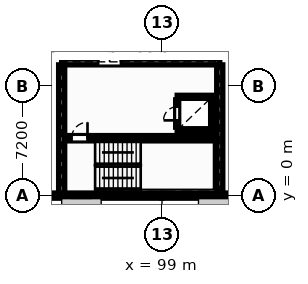
"""IFC4 building model, lengths in metres.
Left out: names, types, materials, properties, quantities, classifications, styles, units other than length and angle.
Written with IfcOpenShell. Run it as: python <this file> out.ifc"""

import sys

from ifc_helpers import new_model, si_unit, direction, frame, frame_2d, origin, place, context, subcontext, project, spatial, rectangle, extrude, element, fill, save


model = new_model("IFC4")
c1 = context("Model", 3, precision=1e-05, world=origin(), true_north=direction((0.0, 1.0)))
c2 = subcontext(c1, "Body", "Model", "MODEL_VIEW")
j1 = project(units=[si_unit("LENGTHUNIT", "METRE"), si_unit("PLANEANGLEUNIT", "RADIAN")], contexts=[c1])
p1 = place(None, origin())
s1 = spatial("IfcSite", under=j1, at=p1, CompositionType="ELEMENT")
p2 = place(p1, origin())
s2 = spatial("IfcBuilding", under=s1, at=p2, CompositionType="ELEMENT")
p3 = place(p2, frame((0.0, 0.0, 5.1)))
s3 = spatial("IfcBuildingStorey", under=s2, at=p3, CompositionType="ELEMENT", Elevation=5.1)
p4 = place(p3, frame((90.0, 0.0, 0.0), z_axis=(0.0, 0.0, 1.0), x_axis=(1.0, 0.0, 0.0)))
e1 = element("IfcWall", 1, at=p4, inside=s3, PredefinedType="SOLIDWALL", context=c2, shape_type="SweptSolid", body=[
    extrude(rectangle(XDim=9.0, YDim=0.34, at=frame_2d((4.5, 0.0))), origin(), (0.0, 0.0, 1.0), 3.55),
])
p5 = place(p4, frame((3.0, 0.0, 0.85)))
e2 = element("IfcOpeningElement", 2, at=p5, cuts=e1, PredefinedType="OPENING", context=c2, shape_type="SweptSolid", body=[
    extrude(rectangle(XDim=1.4, YDim=1.8, at=frame_2d((0.7, 0.9))), frame((0.0, 0.18, 0.0), z_axis=(0.0, -1.0, 0.0), x_axis=(1.0, 0.0, 0.0)), (0.0, 0.0, 1.0), 0.36),
])
p6 = place(p3, frame((99.0, 0.0, 0.0), z_axis=(0.0, 0.0, 1.0), x_axis=(1.0, 0.0, 0.0)))
e3 = element("IfcWall", 3, at=p6, inside=s3, PredefinedType="SOLIDWALL", context=c2, shape_type="SweptSolid", body=[
    extrude(rectangle(XDim=9.0, YDim=0.34, at=frame_2d((4.5, 0.0))), origin(), (0.0, 0.0, 1.0), 3.55),
])
p7 = place(p6, frame((5.2, 0.0, 0.85)))
e4 = element("IfcOpeningElement", 4, at=p7, cuts=e3, PredefinedType="OPENING", context=c2, shape_type="SweptSolid", body=[
    extrude(rectangle(XDim=1.4, YDim=1.8, at=frame_2d((0.7, 0.9))), frame((0.0, 0.18, 0.0), z_axis=(0.0, -1.0, 0.0), x_axis=(1.0, 0.0, 0.0)), (0.0, 0.0, 1.0), 0.36),
])
p8 = place(p3, frame((92.4, 8.8, 0.0), z_axis=(0.0, 0.0, 1.0), x_axis=(1.0, 0.0, 0.0)))
e5 = element("IfcWall", 5, at=p8, inside=s3, PredefinedType="SHEAR", context=c2, shape_type="SweptSolid", body=[
    extrude(rectangle(XDim=10.4, YDim=0.4, at=frame_2d((5.2, 0.0))), origin(), (0.0, 0.0, 1.0), 3.55),
])
p9 = place(p8, frame((2.4, 0.0, 0.0)))
e6 = element("IfcOpeningElement", 6, at=p9, cuts=e5, PredefinedType="OPENING", context=c2, shape_type="SweptSolid", body=[
    extrude(rectangle(XDim=1.5, YDim=2.2, at=frame_2d((0.75, 1.1))), frame((0.0, 0.21, 0.0), z_axis=(0.0, -1.0, 0.0), x_axis=(1.0, 0.0, 0.0)), (0.0, 0.0, 1.0), 0.42),
])
for number, where, z_axis, x_axis in (
    (7, (92.4, 0.17, 0.0), (0.0, 0.0, 1.0), (0.0, 1.0, 0.0)),
    (8, (102.8, 0.17, 0.0), (0.0, 0.0, 1.0), (0.0, 1.0, 0.0)),
):
    element("IfcWall", number, at=place(p3, frame(where, z_axis=z_axis, x_axis=x_axis)), inside=s3, PredefinedType="SHEAR", context=c2, shape_type="SweptSolid", body=[
        extrude(rectangle(XDim=8.43, YDim=0.4, at=frame_2d((4.215, 0.0))), origin(), (0.0, 0.0, 1.0), 3.55),
    ])
p10 = place(p3, frame((92.6, 3.775, 0.0), z_axis=(0.0, 0.0, 1.0), x_axis=(1.0, 0.0, 0.0)))
e9 = element("IfcWall", 9, at=p10, inside=s3, PredefinedType="SHEAR", context=c2, shape_type="SweptSolid", body=[
    extrude(rectangle(XDim=10.0, YDim=0.35, at=frame_2d((5.0, 0.0))), origin(), (0.0, 0.0, 1.0), 3.55),
])
p11 = place(p10, frame((0.45, 0.0, 0.0)))
e10 = element("IfcOpeningElement", 10, at=p11, cuts=e9, PredefinedType="OPENING", context=c2, shape_type="SweptSolid", body=[
    extrude(rectangle(XDim=1.05, YDim=2.2, at=frame_2d((0.525, 1.1))), frame((0.0, 0.185, 0.0), z_axis=(0.0, -1.0, 0.0), x_axis=(1.0, 0.0, 0.0)), (0.0, 0.0, 1.0), 0.37),
])
for number, where, z_axis, x_axis in (
    (11, (100.0, 4.3, 0.0), (0.0, 0.0, 1.0), (1.0, 0.0, 0.0)),
    (12, (100.0, 6.5, 0.0), (0.0, 0.0, 1.0), (1.0, 0.0, 0.0)),
):
    element("IfcWall", number, at=place(p3, frame(where, z_axis=z_axis, x_axis=x_axis)), inside=s3, PredefinedType="PARTITIONING", context=c2, shape_type="SweptSolid", body=[
        extrude(rectangle(XDim=2.3, YDim=0.2, at=frame_2d((1.15, 0.0))), origin(), (0.0, 0.0, 1.0), 3.55),
    ])
p12 = place(p3, frame((100.0, 4.5, 0.0), z_axis=(0.0, 0.0, 1.0), x_axis=(0.0, 1.0, 0.0)))
e13 = element("IfcWall", 13, at=p12, inside=s3, PredefinedType="PARTITIONING", context=c2, shape_type="SweptSolid", body=[
    extrude(rectangle(XDim=1.8, YDim=0.2, at=frame_2d((0.9, 0.0))), origin(), (0.0, 0.0, 1.0), 3.55),
])
p13 = place(p12, frame((0.45, 0.0, 0.0)))
e14 = element("IfcOpeningElement", 14, at=p13, cuts=e13, PredefinedType="OPENING", context=c2, shape_type="SweptSolid", body=[
    extrude(rectangle(XDim=0.9, YDim=2.1, at=frame_2d((0.45, 1.05))), frame((0.0, 0.11, 0.0), z_axis=(0.0, -1.0, 0.0), x_axis=(1.0, 0.0, 0.0)), (0.0, 0.0, 1.0), 0.22),
])
p14 = place(p3, frame((102.3, 4.5, 0.0), z_axis=(0.0, 0.0, 1.0), x_axis=(0.0, 1.0, 0.0)))
e15 = element("IfcWall", 15, at=p14, inside=s3, PredefinedType="PARTITIONING", context=c2, shape_type="SweptSolid", body=[
    extrude(rectangle(XDim=1.8, YDim=0.2, at=frame_2d((0.9, 0.0))), origin(), (0.0, 0.0, 1.0), 3.55),
])
p15 = place(p5, origin())
e16 = element("IfcWindow", 16, at=p15, inside=s3, PartitioningType="SINGLE_PANEL", PredefinedType="WINDOW", context=c2, shape_type="SweptSolid", body=[
    extrude(rectangle(XDim=1.4, YDim=1.8, at=frame_2d((0.7, 0.9))), frame((0.0, 0.03, 0.0), z_axis=(0.0, -1.0, 0.0), x_axis=(1.0, 0.0, 0.0)), (0.0, 0.0, 1.0), 0.06),
])
fill(e2, e16)
p16 = place(p9, origin())
e17 = element("IfcDoor", 17, at=p16, inside=s3, OperationType="DOUBLE_DOOR_SINGLE_SWING", PredefinedType="DOOR", context=c2, shape_type="SweptSolid", body=[
    extrude(rectangle(XDim=1.5, YDim=2.2, at=frame_2d((0.75, 1.1))), frame((0.0, 0.025, 0.0), z_axis=(0.0, -1.0, 0.0), x_axis=(1.0, 0.0, 0.0)), (0.0, 0.0, 1.0), 0.05),
])
fill(e6, e17)
p17 = place(p11, origin())
e18 = element("IfcDoor", 18, at=p17, inside=s3, OperationType="SINGLE_SWING_RIGHT", PredefinedType="DOOR", context=c2, shape_type="SweptSolid", body=[
    extrude(rectangle(XDim=1.05, YDim=2.2, at=frame_2d((0.525, 1.1))), frame((0.0, 0.025, 0.0), z_axis=(0.0, -1.0, 0.0), x_axis=(1.0, 0.0, 0.0)), (0.0, 0.0, 1.0), 0.05),
])
fill(e10, e18)
p18 = place(p13, origin())
e19 = element("IfcDoor", 19, at=p18, inside=s3, OperationType="SINGLE_SWING_LEFT", PredefinedType="DOOR", context=c2, shape_type="SweptSolid", body=[
    extrude(rectangle(XDim=0.9, YDim=2.1, at=frame_2d((0.45, 1.05))), frame((0.0, 0.025, 0.0), z_axis=(0.0, -1.0, 0.0), x_axis=(1.0, 0.0, 0.0)), (0.0, 0.0, 1.0), 0.05),
])
fill(e14, e19)
save(model, sys.argv[1])
